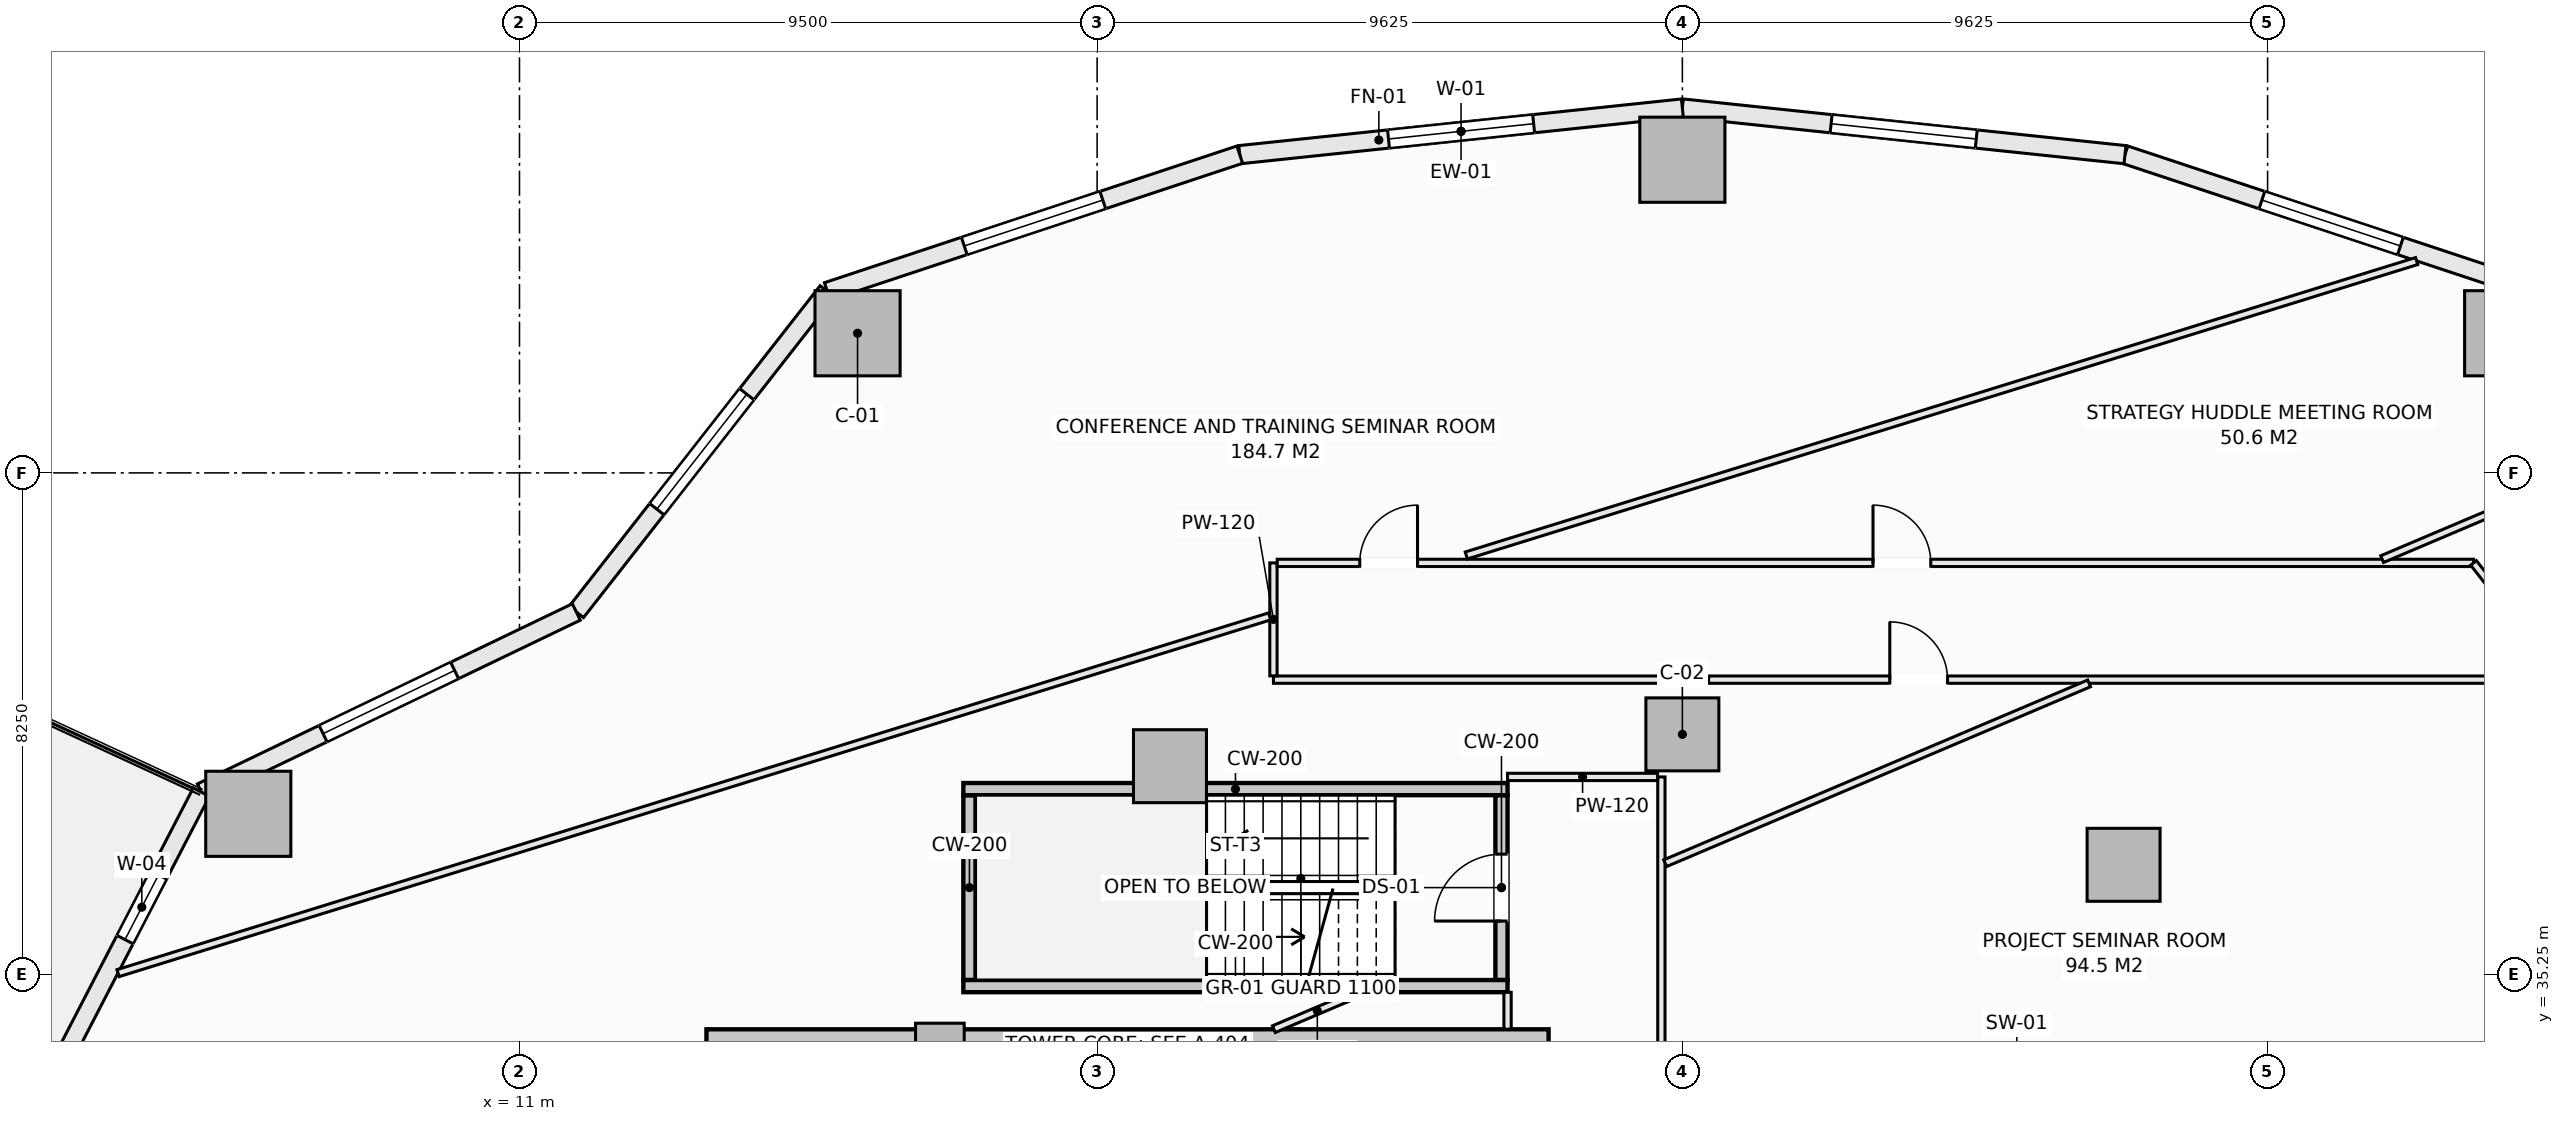
"""IFC4 building model, lengths in metres.
Left out: names, types, materials, properties, quantities, classifications, styles, units other than length and angle.
Written with IfcOpenShell. Run it as: python <this file> out.ifc"""

import sys

from ifc_helpers import new_model, si_unit, direction, frame, frame_2d, origin, origin_2d, place, context, subcontext, project, spatial, rectangle, extrude, element, fill, save


model = new_model("IFC4")
c1 = context("Model", 3, precision=1e-05, world=origin(), true_north=direction((0.0, 1.0)))
c2 = subcontext(c1, "Body", "Model", "MODEL_VIEW")
j1 = project(units=[si_unit("LENGTHUNIT", "METRE"), si_unit("PLANEANGLEUNIT", "RADIAN")], contexts=[c1])
p1 = place(None, origin())
s1 = spatial("IfcSite", under=j1, at=p1, CompositionType="ELEMENT")
p2 = place(p1, origin())
s2 = spatial("IfcBuilding", under=s1, at=p2, CompositionType="ELEMENT")
p3 = place(p2, frame((0.0, 0.0, 41.9)))
s3 = spatial("IfcBuildingStorey", under=s2, at=p3, CompositionType="ELEMENT", Elevation=41.9)
p4 = place(p3, frame((14.075, 33.925, -0.28), z_axis=(0.0, 0.0, 1.0), x_axis=(1.0, 0.0, 0.0)))
e1 = element("IfcWall", 1, at=p4, inside=s3, PredefinedType="SHEAR", context=c2, shape_type="SweptSolid", body=[
    extrude(rectangle(XDim=13.85, YDim=0.85, at=frame_2d((6.925, 0.0))), origin(), (0.0, 0.0, 1.0), 3.85),
])
for number, where, z_axis, x_axis in (
    (2, (43.69, 45.796, -0.28), (0.0, 0.0, 1.0), (1.0, 0.0, 0.0)),
    (3, (30.125, 48.65, -0.28), (0.0, 0.0, 1.0), (1.0, 0.0, 0.0)),
    (4, (16.56, 45.796, -0.28), (0.0, 0.0, 1.0), (1.0, 0.0, 0.0)),
    (5, (6.54, 37.894, -0.28), (0.0, 0.0, 1.0), (1.0, 0.0, 0.0)),
):
    element("IfcColumn", number, at=place(p3, frame(where, z_axis=z_axis, x_axis=x_axis)), inside=s3, PredefinedType="COLUMN", context=c2, shape_type="SweptSolid", body=[
        extrude(rectangle(XDim=1.4, YDim=1.4, at=origin_2d()), origin(), (0.0, 0.0, 1.0), 3.85),
    ])
for number, where, z_axis, x_axis in (
    (6, (37.382, 37.055, -0.28), (0.0, 0.0, 1.0), (1.0, 0.0, 0.0)),
    (7, (30.125, 39.2, -0.28), (0.0, 0.0, 1.0), (1.0, 0.0, 0.0)),
    (8, (21.698, 38.677, -0.28), (0.0, 0.0, 1.0), (1.0, 0.0, 0.0)),
):
    element("IfcColumn", number, at=place(p3, frame(where, z_axis=z_axis, x_axis=x_axis)), inside=s3, PredefinedType="COLUMN", context=c2, shape_type="SweptSolid", body=[
        extrude(rectangle(XDim=1.2, YDim=1.2, at=origin_2d()), origin(), (0.0, 0.0, 1.0), 3.85),
    ])
p5 = place(p3, frame((17.914, 34.05, -0.28), z_axis=(0.0, 0.0, 1.0), x_axis=(1.0, 0.0, 0.0)))
e9 = element("IfcColumn", 9, at=p5, inside=s3, PredefinedType="PILASTER", context=c2, shape_type="SweptSolid", body=[
    extrude(rectangle(XDim=0.8, YDim=0.8, at=origin_2d()), origin(), (0.0, 0.0, 1.0), 3.85),
])
p6 = place(p3, frame((37.404, 48.733, 0.0), z_axis=(0.0, 0.0, 1.0), x_axis=(0.949238715533, -0.31455661006, 0.0)))
e10 = element("IfcWall", 10, at=p6, inside=s3, PredefinedType="SOLIDWALL", context=c2, shape_type="SweptSolid", body=[
    extrude(rectangle(XDim=7.146, YDim=0.3, at=frame_2d((3.573, 0.0))), origin(), (0.0, 0.0, 1.0), 3.093),
])
p7 = place(p6, frame((2.373, 0.0, 0.85)))
e11 = element("IfcOpeningElement", 11, at=p7, cuts=e10, PredefinedType="OPENING", context=c2, shape_type="SweptSolid", body=[
    extrude(rectangle(XDim=2.4, YDim=1.9, at=frame_2d((1.2, 0.95))), frame((0.0, 0.16, 0.0), z_axis=(0.0, -1.0, 0.0), x_axis=(1.0, 0.0, 0.0)), (0.0, 0.0, 1.0), 0.32),
])
p8 = place(p3, frame((30.125, 49.5, 0.0), z_axis=(0.0, 0.0, 1.0), x_axis=(0.994500334317, -0.104733399844, 0.0)))
e12 = element("IfcWall", 12, at=p8, inside=s3, PredefinedType="SOLIDWALL", context=c2, shape_type="SweptSolid", body=[
    extrude(rectangle(XDim=7.32, YDim=0.3, at=frame_2d((3.66, 0.0))), origin(), (0.0, 0.0, 1.0), 3.093),
])
p9 = place(p8, frame((2.46, 0.0, 0.85)))
e13 = element("IfcOpeningElement", 13, at=p9, cuts=e12, PredefinedType="OPENING", context=c2, shape_type="SweptSolid", body=[
    extrude(rectangle(XDim=2.4, YDim=1.9, at=frame_2d((1.2, 0.95))), frame((0.0, 0.16, 0.0), z_axis=(0.0, -1.0, 0.0), x_axis=(1.0, 0.0, 0.0)), (0.0, 0.0, 1.0), 0.32),
])
p10 = place(p3, frame((22.846, 48.733, 0.0), z_axis=(0.0, 0.0, 1.0), x_axis=(0.994500334317, 0.104733399844, 0.0)))
e14 = element("IfcWall", 14, at=p10, inside=s3, PredefinedType="SOLIDWALL", context=c2, shape_type="SweptSolid", body=[
    extrude(rectangle(XDim=7.32, YDim=0.3, at=frame_2d((3.66, 0.0))), origin(), (0.0, 0.0, 1.0), 3.093),
])
p11 = place(p10, frame((2.46, 0.0, 0.85)))
e15 = element("IfcOpeningElement", 15, at=p11, cuts=e14, PredefinedType="OPENING", context=c2, shape_type="SweptSolid", body=[
    extrude(rectangle(XDim=2.4, YDim=1.9, at=frame_2d((1.2, 0.95))), frame((0.0, 0.16, 0.0), z_axis=(0.0, -1.0, 0.0), x_axis=(1.0, 0.0, 0.0)), (0.0, 0.0, 1.0), 0.32),
])
p12 = place(p3, frame((16.062, 46.486, 0.0), z_axis=(0.0, 0.0, 1.0), x_axis=(0.949238715533, 0.31455661006, 0.0)))
e16 = element("IfcWall", 16, at=p12, inside=s3, PredefinedType="SOLIDWALL", context=c2, shape_type="SweptSolid", body=[
    extrude(rectangle(XDim=7.146, YDim=0.3, at=frame_2d((3.573, 0.0))), origin(), (0.0, 0.0, 1.0), 3.093),
])
p13 = place(p12, frame((2.373, 0.0, 0.85)))
e17 = element("IfcOpeningElement", 17, at=p13, cuts=e16, PredefinedType="OPENING", context=c2, shape_type="SweptSolid", body=[
    extrude(rectangle(XDim=2.4, YDim=1.9, at=frame_2d((1.2, 0.95))), frame((0.0, 0.16, 0.0), z_axis=(0.0, -1.0, 0.0), x_axis=(1.0, 0.0, 0.0)), (0.0, 0.0, 1.0), 0.32),
])
p14 = place(p3, frame((11.935, 41.213, 0.0), z_axis=(0.0, 0.0, 1.0), x_axis=(0.616421309777, 0.787416515482, 0.0)))
e18 = element("IfcWall", 18, at=p14, inside=s3, PredefinedType="SOLIDWALL", context=c2, shape_type="SweptSolid", body=[
    extrude(rectangle(XDim=6.696, YDim=0.3, at=frame_2d((3.348, 0.0))), origin(), (0.0, 0.0, 1.0), 3.093),
])
p15 = place(p14, frame((2.148, 0.0, 0.85)))
e19 = element("IfcOpeningElement", 19, at=p15, cuts=e18, PredefinedType="OPENING", context=c2, shape_type="SweptSolid", body=[
    extrude(rectangle(XDim=2.4, YDim=1.9, at=frame_2d((1.2, 0.95))), frame((0.0, 0.16, 0.0), z_axis=(0.0, -1.0, 0.0), x_axis=(1.0, 0.0, 0.0)), (0.0, 0.0, 1.0), 0.32),
])
p16 = place(p3, frame((5.768, 38.25, 0.0), z_axis=(0.0, 0.0, 1.0), x_axis=(0.901360393999, 0.433069786673, 0.0)))
e20 = element("IfcWall", 20, at=p16, inside=s3, PredefinedType="SOLIDWALL", context=c2, shape_type="SweptSolid", body=[
    extrude(rectangle(XDim=6.842, YDim=0.3, at=frame_2d((3.421, 0.0))), origin(), (0.0, 0.0, 1.0), 3.093),
])
p17 = place(p16, frame((2.221, 0.0, 0.85)))
e21 = element("IfcOpeningElement", 21, at=p17, cuts=e20, PredefinedType="OPENING", context=c2, shape_type="SweptSolid", body=[
    extrude(rectangle(XDim=2.4, YDim=1.9, at=frame_2d((1.2, 0.95))), frame((0.0, 0.16, 0.0), z_axis=(0.0, -1.0, 0.0), x_axis=(1.0, 0.0, 0.0)), (0.0, 0.0, 1.0), 0.32),
])
p18 = place(p3, frame((2.958, 32.823, 0.0), z_axis=(0.0, 0.0, 1.0), x_axis=(0.459809804413, 0.88801742312, 0.0)))
e22 = element("IfcWall", 22, at=p18, inside=s3, PredefinedType="SOLIDWALL", context=c2, shape_type="SweptSolid", body=[
    extrude(rectangle(XDim=6.111, YDim=0.3, at=frame_2d((3.055, 0.0))), origin(), (0.0, 0.0, 1.0), 3.093),
])
p19 = place(p18, frame((3.38, 0.0, 0.72)))
e23 = element("IfcOpeningElement", 23, at=p19, cuts=e22, PredefinedType="OPENING", context=c2, shape_type="SweptSolid", body=[
    extrude(rectangle(XDim=1.2, YDim=1.65, at=frame_2d((0.6, 0.825))), frame((0.0, 0.16, 0.0), z_axis=(0.0, -1.0, 0.0), x_axis=(1.0, 0.0, 0.0)), (0.0, 0.0, 1.0), 0.32),
])
p20 = place(p3, frame((27.15, 35.16, -0.28), z_axis=(0.0, 0.0, 1.0), x_axis=(0.0, 1.0, 0.0)))
e24 = element("IfcWall", 24, at=p20, inside=s3, PredefinedType="SHEAR", context=c2, shape_type="SweptSolid", body=[
    extrude(rectangle(XDim=3.04, YDim=0.2, at=frame_2d((1.52, 0.0))), origin(), (0.0, 0.0, 1.0), 3.85),
])
p21 = place(p20, frame((0.97, 0.0, 0.28)))
e25 = element("IfcOpeningElement", 25, at=p21, cuts=e24, PredefinedType="OPENING", context=c2, shape_type="SweptSolid", body=[
    extrude(rectangle(XDim=1.1, YDim=2.15, at=frame_2d((0.55, 1.075))), frame((0.0, 0.11, 0.0), z_axis=(0.0, -1.0, 0.0), x_axis=(1.0, 0.0, 0.0)), (0.0, 0.0, 1.0), 0.22),
])
p22 = place(p3, frame((18.4, 35.16, -0.28), z_axis=(0.0, 0.0, 1.0), x_axis=(0.0, 1.0, 0.0)))
e26 = element("IfcWall", 26, at=p22, inside=s3, PredefinedType="SHEAR", context=c2, shape_type="SweptSolid", body=[
    extrude(rectangle(XDim=3.04, YDim=0.2, at=frame_2d((1.52, 0.0))), origin(), (0.0, 0.0, 1.0), 3.85),
])
for number, where, z_axis, x_axis in (
    (27, (18.3, 38.3, -0.28), (0.0, 0.0, 1.0), (1.0, 0.0, 0.0)),
    (28, (18.3, 35.06, -0.28), (0.0, 0.0, 1.0), (1.0, 0.0, 0.0)),
):
    element("IfcWall", number, at=place(p3, frame(where, z_axis=z_axis, x_axis=x_axis)), inside=s3, PredefinedType="SHEAR", context=c2, shape_type="SweptSolid", body=[
        extrude(rectangle(XDim=8.95, YDim=0.2, at=frame_2d((4.475, 0.0))), origin(), (0.0, 0.0, 1.0), 3.85),
    ])
p23 = place(p3, frame((29.78, 33.64, 0.0), z_axis=(0.0, 0.0, 1.0), x_axis=(0.0, 1.0, 0.0)))
e29 = element("IfcWall", 29, at=p23, inside=s3, PredefinedType="PARTITIONING", context=c2, shape_type="SweptSolid", body=[
    extrude(rectangle(XDim=4.86, YDim=0.12, at=frame_2d((2.43, 0.0))), origin(), (0.0, 0.0, 1.0), 3.57),
])
p24 = place(p3, frame((23.4, 40.1, 0.0), z_axis=(0.0, 0.0, 1.0), x_axis=(1.0, 0.0, 0.0)))
e30 = element("IfcWall", 30, at=p24, inside=s3, PredefinedType="PARTITIONING", context=c2, shape_type="SweptSolid", body=[
    extrude(rectangle(XDim=6.335, YDim=0.12, at=frame_2d((3.167, 0.0))), origin(), (0.0, 0.0, 1.0), 3.57),
])
p25 = place(p3, frame((30.557, 40.1, 0.0), z_axis=(0.0, 0.0, 1.0), x_axis=(1.0, 0.0, 0.0)))
e31 = element("IfcWall", 31, at=p25, inside=s3, PredefinedType="PARTITIONING", context=c2, shape_type="SweptSolid", body=[
    extrude(rectangle(XDim=13.731, YDim=0.12, at=frame_2d((6.866, 0.0))), origin(), (0.0, 0.0, 1.0), 3.57),
])
p26 = place(p25, frame((2.979, 0.0, 0.0)))
e32 = element("IfcOpeningElement", 32, at=p26, cuts=e31, PredefinedType="OPENING", context=c2, shape_type="SweptSolid", body=[
    extrude(rectangle(XDim=0.95, YDim=2.1, at=frame_2d((0.475, 1.05))), frame((0.0, 0.07, 0.0), z_axis=(0.0, -1.0, 0.0), x_axis=(1.0, 0.0, 0.0)), (0.0, 0.0, 1.0), 0.14),
])
p27 = place(p3, frame((23.4, 40.162, 0.0), z_axis=(0.0, 0.0, 1.0), x_axis=(0.0, 1.0, 0.0)))
e33 = element("IfcWall", 33, at=p27, inside=s3, PredefinedType="PARTITIONING", context=c2, shape_type="SweptSolid", body=[
    extrude(rectangle(XDim=1.858, YDim=0.12, at=frame_2d((0.929, 0.0))), origin(), (0.0, 0.0, 1.0), 3.57),
])
p28 = place(p3, frame((23.462, 42.02, 0.0), z_axis=(0.0, 0.0, 1.0), x_axis=(1.0, 0.0, 0.0)))
e34 = element("IfcWall", 34, at=p28, inside=s3, PredefinedType="PARTITIONING", context=c2, shape_type="SweptSolid", body=[
    extrude(rectangle(XDim=19.675, YDim=0.12, at=frame_2d((9.837, 0.0))), origin(), (0.0, 0.0, 1.0), 3.57),
])
p29 = place(p28, frame((9.798, 0.0, 0.0)))
e35 = element("IfcOpeningElement", 35, at=p29, cuts=e34, PredefinedType="OPENING", context=c2, shape_type="SweptSolid", body=[
    extrude(rectangle(XDim=0.95, YDim=2.1, at=frame_2d((0.475, 1.05))), frame((0.0, 0.07, 0.0), z_axis=(0.0, -1.0, 0.0), x_axis=(1.0, 0.0, 0.0)), (0.0, 0.0, 1.0), 0.14),
])
p30 = place(p28, frame((1.357, 0.0, 0.0)))
e36 = element("IfcOpeningElement", 36, at=p30, cuts=e34, PredefinedType="OPENING", context=c2, shape_type="SweptSolid", body=[
    extrude(rectangle(XDim=0.95, YDim=2.1, at=frame_2d((0.475, 1.05))), frame((0.0, 0.07, 0.0), z_axis=(0.0, -1.0, 0.0), x_axis=(1.0, 0.0, 0.0)), (0.0, 0.0, 1.0), 0.14),
])
p31 = place(p3, frame((43.137, 42.02, 0.0), z_axis=(0.0, 0.0, 1.0), x_axis=(0.616441660183, -0.787400583941, 0.0)))
e37 = element("IfcWall", 37, at=p31, inside=s3, PredefinedType="PARTITIONING", context=c2, shape_type="SweptSolid", body=[
    extrude(rectangle(XDim=5.083, YDim=0.12, at=frame_2d((2.541, 0.0))), origin(), (0.0, 0.0, 1.0), 3.57),
])
p32 = place(p3, frame((27.25, 34.352, 0.0), z_axis=(0.0, 0.0, 1.0), x_axis=(0.0, 1.0, 0.0)))
e38 = element("IfcWall", 38, at=p32, inside=s3, PredefinedType="PARTITIONING", context=c2, shape_type="SweptSolid", body=[
    extrude(rectangle(XDim=0.606, YDim=0.12, at=frame_2d((0.303, 0.0))), origin(), (0.0, 0.0, 1.0), 3.57),
])
p33 = place(p3, frame((27.25, 38.5, 0.0), z_axis=(0.0, 0.0, 1.0), x_axis=(1.0, 0.0, 0.0)))
e39 = element("IfcWall", 39, at=p33, inside=s3, PredefinedType="PARTITIONING", context=c2, shape_type="SweptSolid", body=[
    extrude(rectangle(XDim=2.468, YDim=0.12, at=frame_2d((1.234, 0.0))), origin(), (0.0, 0.0, 1.0), 3.57),
])
p34 = place(p3, frame((23.407, 34.352, 0.0), z_axis=(0.0, 0.0, 1.0), x_axis=(0.920643464024, 0.390404421273, 0.0)))
e40 = element("IfcWall", 40, at=p34, inside=s3, PredefinedType="PARTITIONING", context=c2, shape_type="SweptSolid", body=[
    extrude(rectangle(XDim=1.552, YDim=0.12, at=frame_2d((0.776, 0.0))), origin(), (0.0, 0.0, 1.0), 3.57),
])
p35 = place(p3, frame((29.842, 37.081, 0.0), z_axis=(0.0, 0.0, 1.0), x_axis=(0.920622518337, 0.390453811265, 0.0)))
e41 = element("IfcWall", 41, at=p35, inside=s3, PredefinedType="PARTITIONING", context=c2, shape_type="SweptSolid", body=[
    extrude(rectangle(XDim=7.573, YDim=0.12, at=frame_2d((3.787, 0.0))), origin(), (0.0, 0.0, 1.0), 3.57),
])
p36 = place(p3, frame((41.634, 42.082, 0.0), z_axis=(0.0, 0.0, 1.0), x_axis=(0.920618281514, 0.39046380081, 0.0)))
e42 = element("IfcWall", 42, at=p36, inside=s3, PredefinedType="PARTITIONING", context=c2, shape_type="SweptSolid", body=[
    extrude(rectangle(XDim=4.736, YDim=0.12, at=frame_2d((2.368, 0.0))), origin(), (0.0, 0.0, 1.0), 3.57),
])
p37 = place(p3, frame((4.398, 35.273, 0.0), z_axis=(0.0, 0.0, 1.0), x_axis=(0.955217133812, 0.295905774314, 0.0)))
e43 = element("IfcWall", 43, at=p37, inside=s3, PredefinedType="PARTITIONING", context=c2, shape_type="SweptSolid", body=[
    extrude(rectangle(XDim=19.828, YDim=0.12, at=frame_2d((9.914, 0.0))), origin(), (0.0, 0.0, 1.0), 3.205),
])
p38 = place(p3, frame((26.572, 42.142, 0.0), z_axis=(0.0, 0.0, 1.0), x_axis=(0.955220139549, 0.295896071282, 0.0)))
e44 = element("IfcWall", 44, at=p38, inside=s3, PredefinedType="PARTITIONING", context=c2, shape_type="SweptSolid", body=[
    extrude(rectangle(XDim=16.362, YDim=0.12, at=frame_2d((8.181, 0.0))), origin(), (0.0, 0.0, 1.0), 3.093),
])
p39 = place(p7, origin())
e45 = element("IfcWindow", 45, at=p39, inside=s3, PartitioningType="SINGLE_PANEL", PredefinedType="WINDOW", context=c2, shape_type="SweptSolid", body=[
    extrude(rectangle(XDim=2.4, YDim=1.9, at=frame_2d((1.2, 0.95))), frame((0.0, 0.03, 0.0), z_axis=(0.0, -1.0, 0.0), x_axis=(1.0, 0.0, 0.0)), (0.0, 0.0, 1.0), 0.06),
])
fill(e11, e45)
p40 = place(p9, origin())
e46 = element("IfcWindow", 46, at=p40, inside=s3, PartitioningType="SINGLE_PANEL", PredefinedType="WINDOW", context=c2, shape_type="SweptSolid", body=[
    extrude(rectangle(XDim=2.4, YDim=1.9, at=frame_2d((1.2, 0.95))), frame((0.0, 0.03, 0.0), z_axis=(0.0, -1.0, 0.0), x_axis=(1.0, 0.0, 0.0)), (0.0, 0.0, 1.0), 0.06),
])
fill(e13, e46)
p41 = place(p11, origin())
e47 = element("IfcWindow", 47, at=p41, inside=s3, PartitioningType="SINGLE_PANEL", PredefinedType="WINDOW", context=c2, shape_type="SweptSolid", body=[
    extrude(rectangle(XDim=2.4, YDim=1.9, at=frame_2d((1.2, 0.95))), frame((0.0, 0.03, 0.0), z_axis=(0.0, -1.0, 0.0), x_axis=(1.0, 0.0, 0.0)), (0.0, 0.0, 1.0), 0.06),
])
fill(e15, e47)
p42 = place(p13, origin())
e48 = element("IfcWindow", 48, at=p42, inside=s3, PartitioningType="SINGLE_PANEL", PredefinedType="WINDOW", context=c2, shape_type="SweptSolid", body=[
    extrude(rectangle(XDim=2.4, YDim=1.9, at=frame_2d((1.2, 0.95))), frame((0.0, 0.03, 0.0), z_axis=(0.0, -1.0, 0.0), x_axis=(1.0, 0.0, 0.0)), (0.0, 0.0, 1.0), 0.06),
])
fill(e17, e48)
p43 = place(p15, origin())
e49 = element("IfcWindow", 49, at=p43, inside=s3, PartitioningType="SINGLE_PANEL", PredefinedType="WINDOW", context=c2, shape_type="SweptSolid", body=[
    extrude(rectangle(XDim=2.4, YDim=1.9, at=frame_2d((1.2, 0.95))), frame((0.0, 0.03, 0.0), z_axis=(0.0, -1.0, 0.0), x_axis=(1.0, 0.0, 0.0)), (0.0, 0.0, 1.0), 0.06),
])
fill(e19, e49)
p44 = place(p17, origin())
e50 = element("IfcWindow", 50, at=p44, inside=s3, PartitioningType="SINGLE_PANEL", PredefinedType="WINDOW", context=c2, shape_type="SweptSolid", body=[
    extrude(rectangle(XDim=2.4, YDim=1.9, at=frame_2d((1.2, 0.95))), frame((0.0, 0.03, 0.0), z_axis=(0.0, -1.0, 0.0), x_axis=(1.0, 0.0, 0.0)), (0.0, 0.0, 1.0), 0.06),
])
fill(e21, e50)
p45 = place(p19, origin())
e51 = element("IfcWindow", 51, at=p45, inside=s3, PartitioningType="SINGLE_PANEL", PredefinedType="WINDOW", context=c2, shape_type="SweptSolid", body=[
    extrude(rectangle(XDim=1.2, YDim=1.65, at=frame_2d((0.6, 0.825))), frame((0.0, 0.03, 0.0), z_axis=(0.0, -1.0, 0.0), x_axis=(1.0, 0.0, 0.0)), (0.0, 0.0, 1.0), 0.06),
])
fill(e23, e51)
p46 = place(p21, origin())
e52 = element("IfcDoor", 52, at=p46, inside=s3, OperationType="SINGLE_SWING_LEFT", PredefinedType="DOOR", context=c2, shape_type="SweptSolid", body=[
    extrude(rectangle(XDim=1.1, YDim=2.15, at=frame_2d((0.55, 1.075))), frame((0.0, 0.025, 0.0), z_axis=(0.0, -1.0, 0.0), x_axis=(1.0, 0.0, 0.0)), (0.0, 0.0, 1.0), 0.05),
])
fill(e25, e52)
p47 = place(p29, origin())
e53 = element("IfcDoor", 53, at=p47, inside=s3, OperationType="SINGLE_SWING_LEFT", PredefinedType="DOOR", context=c2, shape_type="SweptSolid", body=[
    extrude(rectangle(XDim=0.95, YDim=2.1, at=frame_2d((0.475, 1.05))), frame((0.0, 0.025, 0.0), z_axis=(0.0, -1.0, 0.0), x_axis=(1.0, 0.0, 0.0)), (0.0, 0.0, 1.0), 0.05),
])
fill(e35, e53)
p48 = place(p30, origin())
e54 = element("IfcDoor", 54, at=p48, inside=s3, OperationType="SINGLE_SWING_RIGHT", PredefinedType="DOOR", context=c2, shape_type="SweptSolid", body=[
    extrude(rectangle(XDim=0.95, YDim=2.1, at=frame_2d((0.475, 1.05))), frame((0.0, 0.025, 0.0), z_axis=(0.0, -1.0, 0.0), x_axis=(1.0, 0.0, 0.0)), (0.0, 0.0, 1.0), 0.05),
])
fill(e36, e54)
p49 = place(p26, origin())
e55 = element("IfcDoor", 55, at=p49, inside=s3, OperationType="SINGLE_SWING_LEFT", PredefinedType="DOOR", context=c2, shape_type="SweptSolid", body=[
    extrude(rectangle(XDim=0.95, YDim=2.1, at=frame_2d((0.475, 1.05))), frame((0.0, 0.025, 0.0), z_axis=(0.0, -1.0, 0.0), x_axis=(1.0, 0.0, 0.0)), (0.0, 0.0, 1.0), 0.05),
])
fill(e32, e55)
save(model, sys.argv[1])
